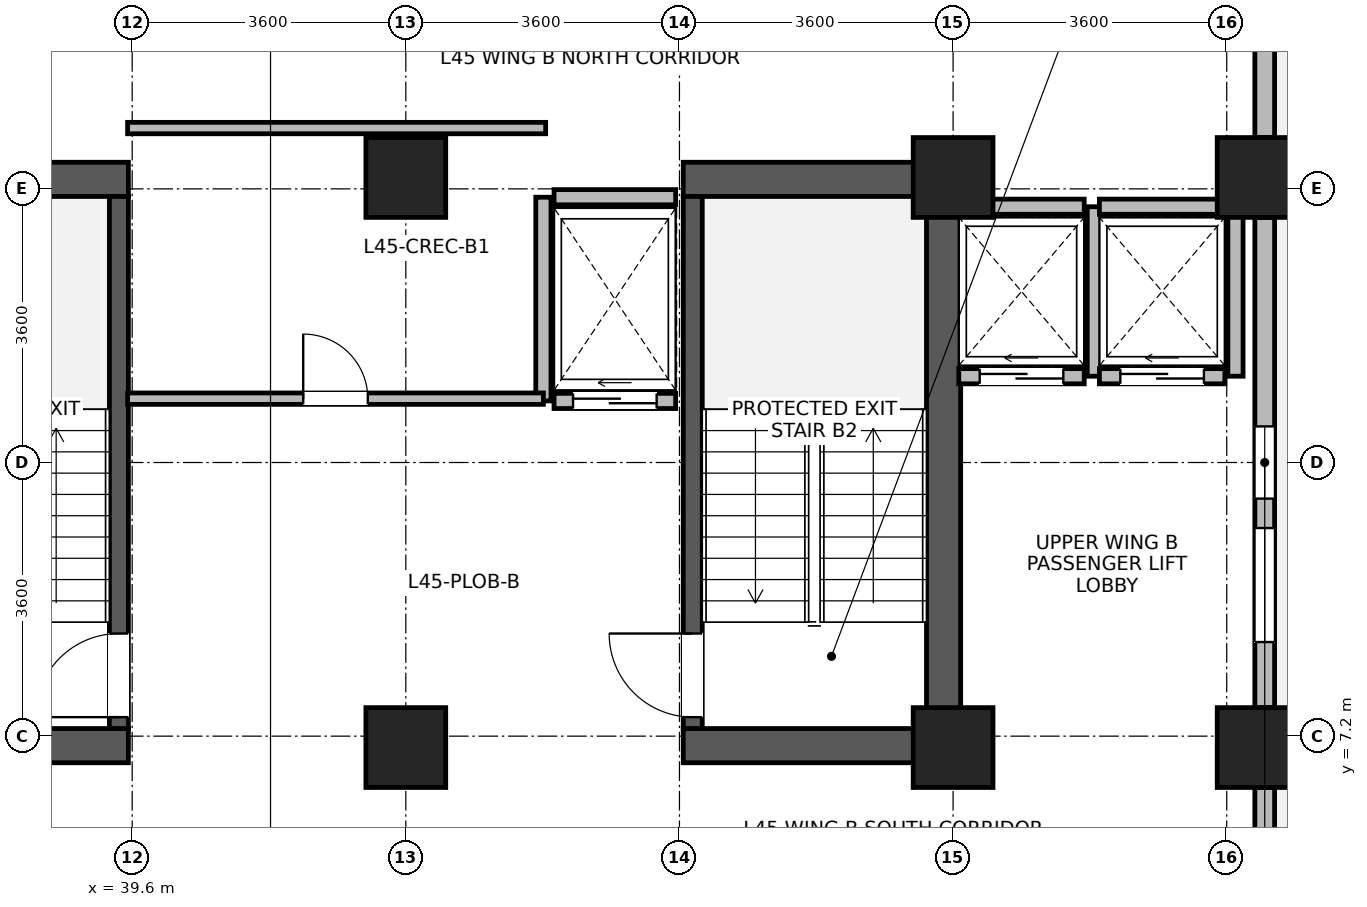
"""IFC4 building model, lengths in metres.
Left out: names, types, materials, properties, quantities, classifications, styles, units other than length and angle.
Written with IfcOpenShell. Run it as: python <this file> out.ifc"""

import sys

from ifc_helpers import new_model, si_unit, direction, frame, frame_2d, origin, origin_2d, place, context, subcontext, project, spatial, rectangle, extrude, source, transform, mapped, element, fill, save


model = new_model("IFC4")
c1 = context("Model", 3, precision=1e-05, world=origin(), true_north=direction((0.0, 1.0)))
c2 = subcontext(c1, "Body", "Model", "MODEL_VIEW")
j1 = project(units=[si_unit("LENGTHUNIT", "METRE"), si_unit("PLANEANGLEUNIT", "RADIAN")], contexts=[c1])
p1 = place(None, origin())
s1 = spatial("IfcSite", under=j1, at=p1, CompositionType="ELEMENT")
p2 = place(p1, origin())
s2 = spatial("IfcBuilding", under=s1, at=p2, CompositionType="ELEMENT")
p3 = place(p2, frame((0.0, 0.0, 177.2)))
s3 = spatial("IfcBuildingStorey", under=s2, at=p3, CompositionType="ELEMENT", Elevation=177.2)
p4 = place(p3, frame((50.275, 6.85, 0.0), z_axis=(0.0, 0.0, 1.0), x_axis=(0.0, 1.0, 0.0)))
e1 = element("IfcWall", 1, at=p4, inside=s3, PredefinedType="SHEAR", context=c2, shape_type="SweptSolid", body=[
    extrude(rectangle(XDim=7.9, YDim=0.45, at=frame_2d((3.95, 0.0))), origin(), (0.0, 0.0, 1.0), 3.46),
])
for number, where, z_axis, x_axis in (
    (2, (36.35, 7.075, 0.0), (0.0, 0.0, 1.0), (1.0, 0.0, 0.0)),
    (3, (46.85, 7.075, 0.0), (0.0, 0.0, 1.0), (1.0, 0.0, 0.0)),
    (4, (36.35, 14.525, 0.0), (0.0, 0.0, 1.0), (1.0, 0.0, 0.0)),
    (5, (46.85, 14.525, 0.0), (0.0, 0.0, 1.0), (1.0, 0.0, 0.0)),
):
    element("IfcWall", number, at=place(p3, frame(where, z_axis=z_axis, x_axis=x_axis)), inside=s3, PredefinedType="SHEAR", context=c2, shape_type="SweptSolid", body=[
        extrude(rectangle(XDim=3.2, YDim=0.45, at=frame_2d((1.6, 0.0))), origin(), (0.0, 0.0, 1.0), 3.46),
    ])
p5 = place(p3, frame((39.425, 7.3, 0.0), z_axis=(0.0, 0.0, 1.0), x_axis=(0.0, 1.0, 0.0)))
e6 = element("IfcWall", 6, at=p5, inside=s3, PredefinedType="SHEAR", context=c2, shape_type="SweptSolid", body=[
    extrude(rectangle(XDim=7.0, YDim=0.25, at=frame_2d((3.5, 0.0))), origin(), (0.0, 0.0, 1.0), 3.46),
])
p6 = place(p5, frame((0.15, 0.0, 0.0)))
e7 = element("IfcOpeningElement", 7, at=p6, cuts=e6, PredefinedType="OPENING", context=c2, shape_type="SweptSolid", body=[
    extrude(rectangle(XDim=1.1, YDim=2.08, at=frame_2d((0.55, 1.04))), frame((0.0, 0.135, 0.0), z_axis=(0.0, -1.0, 0.0), x_axis=(1.0, 0.0, 0.0)), (0.0, 0.0, 1.0), 0.27),
])
p7 = place(p3, frame((46.975, 7.3, 0.0), z_axis=(0.0, 0.0, 1.0), x_axis=(0.0, 1.0, 0.0)))
e8 = element("IfcWall", 8, at=p7, inside=s3, PredefinedType="SHEAR", context=c2, shape_type="SweptSolid", body=[
    extrude(rectangle(XDim=7.0, YDim=0.25, at=frame_2d((3.5, 0.0))), origin(), (0.0, 0.0, 1.0), 3.46),
])
p8 = place(p7, frame((0.15, 0.0, 0.0)))
e9 = element("IfcOpeningElement", 9, at=p8, cuts=e8, PredefinedType="OPENING", context=c2, shape_type="SweptSolid", body=[
    extrude(rectangle(XDim=1.1, YDim=2.08, at=frame_2d((0.55, 1.04))), frame((0.0, 0.135, 0.0), z_axis=(0.0, -1.0, 0.0), x_axis=(1.0, 0.0, 0.0)), (0.0, 0.0, 1.0), 0.27),
])
m1 = source(origin(), c2, "Body", "SweptSolid", [
    extrude(rectangle(XDim=1.05, YDim=1.05, at=origin_2d()), origin(), (0.0, 0.0, 1.0), 3.7),
])
for number, where, z_axis, x_axis in (
    (10, (43.2, 7.05, 0.0), (0.0, 0.0, 1.0), (1.0, 0.0, 0.0)),
    (11, (43.2, 14.55, 0.0), (0.0, 0.0, 1.0), (1.0, 0.0, 0.0)),
    (12, (50.4, 7.05, 0.0), (0.0, 0.0, 1.0), (1.0, 0.0, 0.0)),
    (13, (50.4, 14.55, 0.0), (0.0, 0.0, 1.0), (1.0, 0.0, 0.0)),
    (14, (54.4, 7.05, 0.0), (0.0, 0.0, 1.0), (1.0, 0.0, 0.0)),
    (15, (54.4, 14.55, 0.0), (0.0, 0.0, 1.0), (1.0, 0.0, 0.0)),
):
    element("IfcColumn", number, at=place(p3, frame(where, z_axis=z_axis, x_axis=x_axis)), inside=s3, PredefinedType="COLUMN", context=c2, shape_type="MappedRepresentation", body=[
        mapped(m1, transform((0.0, 0.0, 0.0), x_axis=(1.0, 0.0, 0.0), y_axis=(0.0, 1.0, 0.0), z_axis=(0.0, 0.0, 1.0), scale=1.0)),
    ])
p9 = place(p3, frame((54.5, 6.524, 0.0), z_axis=(0.0, 0.0, 1.0), x_axis=(0.0, -1.0, 0.0)))
e16 = element("IfcWall", 16, at=p9, inside=s3, PredefinedType="STANDARD", context=c2, shape_type="SweptSolid", body=[
    extrude(rectangle(XDim=1.854, YDim=0.26, at=frame_2d((0.927, 0.0))), origin(), (0.0, 0.0, 1.0), 3.44),
])
p10 = place(p3, frame((54.5, 14.024, 0.0), z_axis=(0.0, 0.0, 1.0), x_axis=(0.0, -1.0, 0.0)))
e17 = element("IfcWall", 17, at=p10, inside=s3, PredefinedType="STANDARD", context=c2, shape_type="SweptSolid", body=[
    extrude(rectangle(XDim=6.448, YDim=0.26, at=frame_2d((3.224, 0.0))), origin(), (0.0, 0.0, 1.0), 2.99),
])
p11 = place(p10, frame((4.086, 0.0, 0.85)))
e18 = element("IfcOpeningElement", 18, at=p11, cuts=e17, PredefinedType="OPENING", context=c2, shape_type="SweptSolid", body=[
    extrude(rectangle(XDim=1.5, YDim=1.85, at=frame_2d((0.75, 0.925))), frame((0.0, 0.14, 0.0), z_axis=(0.0, -1.0, 0.0), x_axis=(1.0, 0.0, 0.0)), (0.0, 0.0, 1.0), 0.28),
])
p12 = place(p10, frame((2.749, 0.0, 0.85)))
e19 = element("IfcOpeningElement", 19, at=p12, cuts=e17, PredefinedType="OPENING", context=c2, shape_type="SweptSolid", body=[
    extrude(rectangle(XDim=0.95, YDim=1.75, at=frame_2d((0.475, 0.875))), frame((0.0, 0.14, 0.0), z_axis=(0.0, -1.0, 0.0), x_axis=(1.0, 0.0, 0.0)), (0.0, 0.0, 1.0), 0.28),
])
p13 = place(p3, frame((54.5, 21.074, 0.0), z_axis=(0.0, 0.0, 1.0), x_axis=(0.0, -1.0, 0.0)))
e20 = element("IfcWall", 20, at=p13, inside=s3, PredefinedType="STANDARD", context=c2, shape_type="SweptSolid", body=[
    extrude(rectangle(XDim=5.998, YDim=0.26, at=frame_2d((2.999, 0.0))), origin(), (0.0, 0.0, 1.0), 2.99),
])
p14 = place(p13, frame((2.249, 0.0, 0.0)))
e21 = element("IfcOpeningElement", 21, at=p14, cuts=e20, PredefinedType="OPENING", context=c2, shape_type="SweptSolid", body=[
    extrude(rectangle(XDim=1.5, YDim=2.15, at=frame_2d((0.75, 1.075))), frame((0.0, 0.14, 0.0), z_axis=(0.0, -1.0, 0.0), x_axis=(1.0, 0.0, 0.0)), (0.0, 0.0, 1.0), 0.28),
])
p15 = place(p3, frame((50.475, 11.935, 0.0), z_axis=(0.0, 0.0, 1.0), x_axis=(1.0, 0.0, 0.0)))
e22 = element("IfcWall", 22, at=p15, inside=s3, PredefinedType="PARTITIONING", context=c2, shape_type="SweptSolid", body=[
    extrude(rectangle(XDim=1.65, YDim=0.2, at=frame_2d((0.825, 0.0))), origin(), (0.0, 0.0, 1.0), 3.44),
])
p16 = place(p15, frame((0.275, 0.0, 0.0)))
e23 = element("IfcOpeningElement", 23, at=p16, cuts=e22, PredefinedType="OPENING", context=c2, shape_type="SweptSolid", body=[
    extrude(rectangle(XDim=1.1, YDim=2.12, at=frame_2d((0.55, 1.06))), frame((0.0, 0.11, 0.0), z_axis=(0.0, -1.0, 0.0), x_axis=(1.0, 0.0, 0.0)), (0.0, 0.0, 1.0), 0.22),
])
p17 = place(p3, frame((50.475, 14.165, 0.0), z_axis=(0.0, 0.0, 1.0), x_axis=(1.0, 0.0, 0.0)))
e24 = element("IfcWall", 24, at=p17, inside=s3, PredefinedType="PARTITIONING", context=c2, shape_type="SweptSolid", body=[
    extrude(rectangle(XDim=1.65, YDim=0.2, at=frame_2d((0.825, 0.0))), origin(), (0.0, 0.0, 1.0), 3.44),
])
p18 = place(p3, frame((52.265, 11.935, 0.0), z_axis=(0.0, 0.0, 1.0), x_axis=(0.0, 1.0, 0.0)))
e25 = element("IfcWall", 25, at=p18, inside=s3, PredefinedType="PARTITIONING", context=c2, shape_type="SweptSolid", body=[
    extrude(rectangle(XDim=2.23, YDim=0.2, at=frame_2d((1.115, 0.0))), origin(), (0.0, 0.0, 1.0), 3.44),
])
p19 = place(p3, frame((52.325, 11.935, 0.0), z_axis=(0.0, 0.0, 1.0), x_axis=(1.0, 0.0, 0.0)))
e26 = element("IfcWall", 26, at=p19, inside=s3, PredefinedType="PARTITIONING", context=c2, shape_type="SweptSolid", body=[
    extrude(rectangle(XDim=1.65, YDim=0.2, at=frame_2d((0.825, 0.0))), origin(), (0.0, 0.0, 1.0), 3.44),
])
p20 = place(p19, frame((0.275, 0.0, 0.0)))
e27 = element("IfcOpeningElement", 27, at=p20, cuts=e26, PredefinedType="OPENING", context=c2, shape_type="SweptSolid", body=[
    extrude(rectangle(XDim=1.1, YDim=2.12, at=frame_2d((0.55, 1.06))), frame((0.0, 0.11, 0.0), z_axis=(0.0, -1.0, 0.0), x_axis=(1.0, 0.0, 0.0)), (0.0, 0.0, 1.0), 0.22),
])
p21 = place(p3, frame((52.325, 14.165, 0.0), z_axis=(0.0, 0.0, 1.0), x_axis=(1.0, 0.0, 0.0)))
e28 = element("IfcWall", 28, at=p21, inside=s3, PredefinedType="PARTITIONING", context=c2, shape_type="SweptSolid", body=[
    extrude(rectangle(XDim=1.65, YDim=0.2, at=frame_2d((0.825, 0.0))), origin(), (0.0, 0.0, 1.0), 3.44),
])
p22 = place(p3, frame((54.115, 11.935, 0.0), z_axis=(0.0, 0.0, 1.0), x_axis=(0.0, 1.0, 0.0)))
e29 = element("IfcWall", 29, at=p22, inside=s3, PredefinedType="PARTITIONING", context=c2, shape_type="SweptSolid", body=[
    extrude(rectangle(XDim=2.23, YDim=0.2, at=frame_2d((1.115, 0.0))), origin(), (0.0, 0.0, 1.0), 2.99),
])
p23 = place(p3, frame((45.15, 11.61, 0.0), z_axis=(0.0, 0.0, 1.0), x_axis=(1.0, 0.0, 0.0)))
e30 = element("IfcWall", 30, at=p23, inside=s3, PredefinedType="PARTITIONING", context=c2, shape_type="SweptSolid", body=[
    extrude(rectangle(XDim=1.6, YDim=0.2, at=frame_2d((0.8, 0.0))), origin(), (0.0, 0.0, 1.0), 3.44),
])
p24 = place(p23, frame((0.25, 0.0, 0.0)))
e31 = element("IfcOpeningElement", 31, at=p24, cuts=e30, PredefinedType="OPENING", context=c2, shape_type="SweptSolid", body=[
    extrude(rectangle(XDim=1.1, YDim=2.12, at=frame_2d((0.55, 1.06))), frame((0.0, 0.11, 0.0), z_axis=(0.0, -1.0, 0.0), x_axis=(1.0, 0.0, 0.0)), (0.0, 0.0, 1.0), 0.22),
])
p25 = place(p3, frame((45.15, 14.29, 0.0), z_axis=(0.0, 0.0, 1.0), x_axis=(1.0, 0.0, 0.0)))
e32 = element("IfcWall", 32, at=p25, inside=s3, PredefinedType="PARTITIONING", context=c2, shape_type="SweptSolid", body=[
    extrude(rectangle(XDim=1.6, YDim=0.2, at=frame_2d((0.8, 0.0))), origin(), (0.0, 0.0, 1.0), 2.44),
])
p26 = place(p3, frame((45.01, 11.61, 0.0), z_axis=(0.0, 0.0, 1.0), x_axis=(0.0, 1.0, 0.0)))
e33 = element("IfcWall", 33, at=p26, inside=s3, PredefinedType="PARTITIONING", context=c2, shape_type="SweptSolid", body=[
    extrude(rectangle(XDim=2.68, YDim=0.2, at=frame_2d((1.34, 0.0))), origin(), (0.0, 0.0, 1.0), 3.44),
])
p27 = place(p3, frame((39.54, 11.64, 0.0), z_axis=(0.0, 0.0, 1.0), x_axis=(1.0, 0.0, 0.0)))
e34 = element("IfcWall", 34, at=p27, inside=s3, PredefinedType="PARTITIONING", context=c2, shape_type="SweptSolid", body=[
    extrude(rectangle(XDim=5.47, YDim=0.15, at=frame_2d((2.735, 0.0))), origin(), (0.0, 0.0, 1.0), 3.44),
])
p28 = place(p27, frame((2.31, 0.0, 0.0)))
e35 = element("IfcOpeningElement", 35, at=p28, cuts=e34, PredefinedType="OPENING", context=c2, shape_type="SweptSolid", body=[
    extrude(rectangle(XDim=0.85, YDim=2.04, at=frame_2d((0.425, 1.02))), frame((0.0, 0.085, 0.0), z_axis=(0.0, -1.0, 0.0), x_axis=(1.0, 0.0, 0.0)), (0.0, 0.0, 1.0), 0.17),
])
p29 = place(p3, frame((39.54, 15.2, 0.0), z_axis=(0.0, 0.0, 1.0), x_axis=(1.0, 0.0, 0.0)))
e36 = element("IfcWall", 36, at=p29, inside=s3, PredefinedType="PARTITIONING", context=c2, shape_type="SweptSolid", body=[
    extrude(rectangle(XDim=5.5, YDim=0.15, at=frame_2d((2.75, 0.0))), origin(), (0.0, 0.0, 1.0), 3.44),
])
p30 = place(p11, origin())
e37 = element("IfcWindow", 37, at=p30, inside=s3, PartitioningType="SINGLE_PANEL", PredefinedType="WINDOW", context=c2, shape_type="SweptSolid", body=[
    extrude(rectangle(XDim=1.5, YDim=1.85, at=frame_2d((0.75, 0.925))), frame((0.0, 0.03, 0.0), z_axis=(0.0, -1.0, 0.0), x_axis=(1.0, 0.0, 0.0)), (0.0, 0.0, 1.0), 0.06),
])
fill(e18, e37)
p31 = place(p12, origin())
e38 = element("IfcWindow", 38, at=p31, inside=s3, PartitioningType="SINGLE_PANEL", PredefinedType="WINDOW", context=c2, shape_type="SweptSolid", body=[
    extrude(rectangle(XDim=0.95, YDim=1.75, at=frame_2d((0.475, 0.875))), frame((0.0, 0.03, 0.0), z_axis=(0.0, -1.0, 0.0), x_axis=(1.0, 0.0, 0.0)), (0.0, 0.0, 1.0), 0.06),
])
fill(e19, e38)
p32 = place(p6, origin())
e39 = element("IfcDoor", 39, at=p32, inside=s3, OperationType="SINGLE_SWING_LEFT", PredefinedType="DOOR", context=c2, shape_type="SweptSolid", body=[
    extrude(rectangle(XDim=1.1, YDim=2.08, at=frame_2d((0.55, 1.04))), frame((0.0, 0.025, 0.0), z_axis=(0.0, -1.0, 0.0), x_axis=(1.0, 0.0, 0.0)), (0.0, 0.0, 1.0), 0.05),
])
fill(e7, e39)
p33 = place(p8, origin())
e40 = element("IfcDoor", 40, at=p33, inside=s3, OperationType="SINGLE_SWING_RIGHT", PredefinedType="DOOR", context=c2, shape_type="SweptSolid", body=[
    extrude(rectangle(XDim=1.1, YDim=2.08, at=frame_2d((0.55, 1.04))), frame((0.0, 0.025, 0.0), z_axis=(0.0, -1.0, 0.0), x_axis=(1.0, 0.0, 0.0)), (0.0, 0.0, 1.0), 0.05),
])
fill(e9, e40)
p34 = place(p16, origin())
e41 = element("IfcDoor", 41, at=p34, inside=s3, OperationType="SLIDING_TO_LEFT", PredefinedType="DOOR", context=c2, shape_type="SweptSolid", body=[
    extrude(rectangle(XDim=1.1, YDim=2.12, at=frame_2d((0.55, 1.06))), frame((0.0, 0.025, 0.0), z_axis=(0.0, -1.0, 0.0), x_axis=(1.0, 0.0, 0.0)), (0.0, 0.0, 1.0), 0.05),
])
fill(e23, e41)
p35 = place(p20, origin())
e42 = element("IfcDoor", 42, at=p35, inside=s3, OperationType="SLIDING_TO_LEFT", PredefinedType="DOOR", context=c2, shape_type="SweptSolid", body=[
    extrude(rectangle(XDim=1.1, YDim=2.12, at=frame_2d((0.55, 1.06))), frame((0.0, 0.025, 0.0), z_axis=(0.0, -1.0, 0.0), x_axis=(1.0, 0.0, 0.0)), (0.0, 0.0, 1.0), 0.05),
])
fill(e27, e42)
p36 = place(p24, origin())
e43 = element("IfcDoor", 43, at=p36, inside=s3, OperationType="SLIDING_TO_LEFT", PredefinedType="DOOR", context=c2, shape_type="SweptSolid", body=[
    extrude(rectangle(XDim=1.1, YDim=2.12, at=frame_2d((0.55, 1.06))), frame((0.0, 0.025, 0.0), z_axis=(0.0, -1.0, 0.0), x_axis=(1.0, 0.0, 0.0)), (0.0, 0.0, 1.0), 0.05),
])
fill(e31, e43)
p37 = place(p28, origin())
e44 = element("IfcDoor", 44, at=p37, inside=s3, OperationType="SINGLE_SWING_LEFT", PredefinedType="DOOR", context=c2, shape_type="SweptSolid", body=[
    extrude(rectangle(XDim=0.85, YDim=2.04, at=frame_2d((0.425, 1.02))), frame((0.0, 0.025, 0.0), z_axis=(0.0, -1.0, 0.0), x_axis=(1.0, 0.0, 0.0)), (0.0, 0.0, 1.0), 0.05),
])
fill(e35, e44)
save(model, sys.argv[1])
